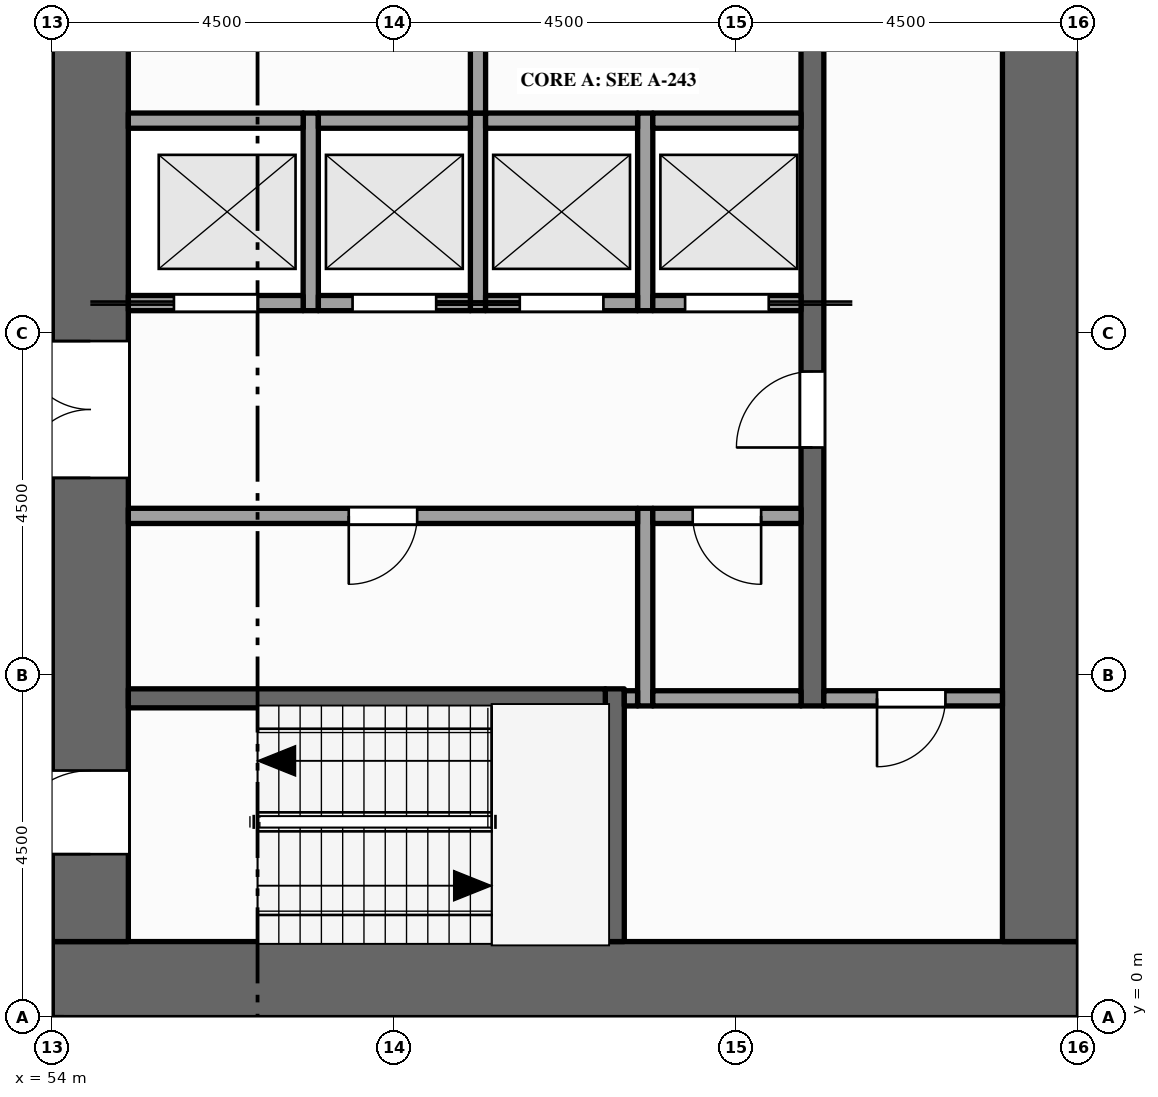
"""IFC4 building model, lengths in metres.
Left out: names, types, materials, properties, quantities, classifications, styles, units other than length and angle.
Written with IfcOpenShell. Run it as: python <this file> out.ifc"""

import sys

from ifc_helpers import new_model, si_unit, direction, frame, frame_2d, origin, place, context, subcontext, project, spatial, rectangle, extrude, element, fill, save


model = new_model("IFC4")
c1 = context("Model", 3, precision=1e-05, world=origin(), true_north=direction((0.0, 1.0)))
c2 = subcontext(c1, "Body", "Model", "MODEL_VIEW")
j1 = project(units=[si_unit("LENGTHUNIT", "METRE"), si_unit("PLANEANGLEUNIT", "RADIAN")], contexts=[c1])
p1 = place(None, origin())
s1 = spatial("IfcSite", under=j1, at=p1, CompositionType="ELEMENT")
p2 = place(p1, origin())
s2 = spatial("IfcBuilding", under=s1, at=p2, CompositionType="ELEMENT")
p3 = place(p2, frame((0.0, 0.0, 239.0)))
s3 = spatial("IfcBuildingStorey", under=s2, at=p3, CompositionType="ELEMENT", Elevation=239.0)
p4 = place(p3, frame((67.5, 0.5, -0.15), z_axis=(0.0, 0.0, 1.0), x_axis=(-1.0, 0.0, 0.0)))
e1 = element("IfcWall", 1, at=p4, inside=s3, PredefinedType="SHEAR", context=c2, shape_type="SweptSolid", body=[
    extrude(rectangle(XDim=13.5, YDim=1.0, at=frame_2d((6.75, 0.0))), origin(), (0.0, 0.0, 1.0), 4.0),
])
p5 = place(p3, frame((54.5, 1.0, -0.15), z_axis=(0.0, 0.0, 1.0), x_axis=(0.0, 1.0, 0.0)))
e2 = element("IfcWall", 2, at=p5, inside=s3, PredefinedType="SHEAR", context=c2, shape_type="SweptSolid", body=[
    extrude(rectangle(XDim=20.5, YDim=1.0, at=frame_2d((10.25, 0.0))), origin(), (0.0, 0.0, 1.0), 4.0),
])
p6 = place(p5, frame((6.1, 0.0, 0.15)))
e3 = element("IfcOpeningElement", 3, at=p6, cuts=e2, PredefinedType="OPENING", context=c2, shape_type="SweptSolid", body=[
    extrude(rectangle(XDim=1.8, YDim=2.1, at=frame_2d((0.9, 1.05))), frame((0.0, 0.51, 0.0), z_axis=(0.0, -1.0, 0.0), x_axis=(1.0, 0.0, 0.0)), (0.0, 0.0, 1.0), 1.02),
])
p7 = place(p5, frame((12.15, 0.0, 0.15)))
e4 = element("IfcOpeningElement", 4, at=p7, cuts=e2, PredefinedType="OPENING", context=c2, shape_type="SweptSolid", body=[
    extrude(rectangle(XDim=1.1, YDim=2.1, at=frame_2d((0.55, 1.05))), frame((0.0, 0.51, 0.0), z_axis=(0.0, -1.0, 0.0), x_axis=(1.0, 0.0, 0.0)), (0.0, 0.0, 1.0), 1.02),
])
p8 = place(p5, frame((1.15, 0.0, 0.15)))
e5 = element("IfcOpeningElement", 5, at=p8, cuts=e2, PredefinedType="OPENING", context=c2, shape_type="SweptSolid", body=[
    extrude(rectangle(XDim=1.1, YDim=2.1, at=frame_2d((0.55, 1.05))), frame((0.0, 0.51, 0.0), z_axis=(0.0, -1.0, 0.0), x_axis=(1.0, 0.0, 0.0)), (0.0, 0.0, 1.0), 1.02),
])
p9 = place(p5, frame((18.35, 0.0, 0.15)))
e6 = element("IfcOpeningElement", 6, at=p9, cuts=e2, PredefinedType="OPENING", context=c2, shape_type="SweptSolid", body=[
    extrude(rectangle(XDim=1.1, YDim=2.1, at=frame_2d((0.55, 1.05))), frame((0.0, 0.51, 0.0), z_axis=(0.0, -1.0, 0.0), x_axis=(1.0, 0.0, 0.0)), (0.0, 0.0, 1.0), 1.02),
])
p10 = place(p3, frame((67.0, 1.0, -0.15), z_axis=(0.0, 0.0, 1.0), x_axis=(0.0, 1.0, 0.0)))
e7 = element("IfcWall", 7, at=p10, inside=s3, PredefinedType="SHEAR", context=c2, shape_type="SweptSolid", body=[
    extrude(rectangle(XDim=20.5, YDim=1.0, at=frame_2d((10.25, 0.0))), origin(), (0.0, 0.0, 1.0), 4.0),
])
for number, where, z_axis, x_axis in (
    (8, (57.4, 9.3, 0.0), (0.0, 0.0, 1.0), (0.0, 1.0, 0.0)),
    (9, (59.6, 9.3, 0.0), (0.0, 0.0, 1.0), (0.0, 1.0, 0.0)),
):
    element("IfcWall", number, at=place(p3, frame(where, z_axis=z_axis, x_axis=x_axis)), inside=s3, PredefinedType="SOLIDWALL", context=c2, shape_type="SweptSolid", body=[
        extrude(rectangle(XDim=2.6, YDim=0.2, at=frame_2d((1.3, 0.0))), origin(), (0.0, 0.0, 1.0), 3.75),
    ])
p11 = place(p3, frame((59.6, 11.9, 0.0), z_axis=(0.0, 0.0, 1.0), x_axis=(0.0, 1.0, 0.0)))
e10 = element("IfcWall", 10, at=p11, inside=s3, PredefinedType="PARTITIONING", context=c2, shape_type="SweptSolid", body=[
    extrude(rectangle(XDim=3.6, YDim=0.2, at=frame_2d((1.8, 0.0))), origin(), (0.0, 0.0, 1.0), 3.75),
])
p12 = place(p11, frame((1.3, 0.0, 0.0)))
e11 = element("IfcOpeningElement", 11, at=p12, cuts=e10, PredefinedType="OPENING", context=c2, shape_type="SweptSolid", body=[
    extrude(rectangle(XDim=1.0, YDim=2.1, at=frame_2d((0.5, 1.05))), frame((0.0, 0.11, 0.0), z_axis=(0.0, -1.0, 0.0), x_axis=(1.0, 0.0, 0.0)), (0.0, 0.0, 1.0), 0.22),
])
p13 = place(p3, frame((61.4, 1.0, 0.0), z_axis=(0.0, 0.0, 1.0), x_axis=(0.0, 1.0, 0.0)))
e12 = element("IfcWall", 12, at=p13, inside=s3, PredefinedType="SHEAR", context=c2, shape_type="SweptSolid", body=[
    extrude(rectangle(XDim=3.325, YDim=0.25, at=frame_2d((1.663, 0.0))), origin(), (0.0, 0.0, 1.0), 3.75),
])
p14 = place(p3, frame((61.8, 4.1, 0.0), z_axis=(0.0, 0.0, 1.0), x_axis=(0.0, 1.0, 0.0)))
e13 = element("IfcWall", 13, at=p14, inside=s3, PredefinedType="PARTITIONING", context=c2, shape_type="SweptSolid", body=[
    extrude(rectangle(XDim=2.6, YDim=0.2, at=frame_2d((1.3, 0.0))), origin(), (0.0, 0.0, 1.0), 3.75),
])
p15 = place(p3, frame((61.8, 9.3, 0.0), z_axis=(0.0, 0.0, 1.0), x_axis=(0.0, 1.0, 0.0)))
e14 = element("IfcWall", 14, at=p15, inside=s3, PredefinedType="SOLIDWALL", context=c2, shape_type="SweptSolid", body=[
    extrude(rectangle(XDim=2.6, YDim=0.2, at=frame_2d((1.3, 0.0))), origin(), (0.0, 0.0, 1.0), 3.75),
])
p16 = place(p3, frame((64.0, 4.1, 0.0), z_axis=(0.0, 0.0, 1.0), x_axis=(0.0, 1.0, 0.0)))
e15 = element("IfcWall", 15, at=p16, inside=s3, PredefinedType="SHEAR", context=c2, shape_type="SweptSolid", body=[
    extrude(rectangle(XDim=14.5, YDim=0.3, at=frame_2d((7.25, 0.0))), origin(), (0.0, 0.0, 1.0), 3.75),
])
p17 = place(p16, frame((3.4, 0.0, 0.0)))
e16 = element("IfcOpeningElement", 16, at=p17, cuts=e15, PredefinedType="OPENING", context=c2, shape_type="SweptSolid", body=[
    extrude(rectangle(XDim=1.0, YDim=2.1, at=frame_2d((0.5, 1.05))), frame((0.0, 0.16, 0.0), z_axis=(0.0, -1.0, 0.0), x_axis=(1.0, 0.0, 0.0)), (0.0, 0.0, 1.0), 0.32),
])
p18 = place(p16, frame((9.1, 0.0, 0.0)))
e17 = element("IfcOpeningElement", 17, at=p18, cuts=e15, PredefinedType="OPENING", context=c2, shape_type="SweptSolid", body=[
    extrude(rectangle(XDim=1.0, YDim=2.1, at=frame_2d((0.5, 1.05))), frame((0.0, 0.16, 0.0), z_axis=(0.0, -1.0, 0.0), x_axis=(1.0, 0.0, 0.0)), (0.0, 0.0, 1.0), 0.32),
])
p19 = place(p3, frame((55.0, 4.2, 0.0), z_axis=(0.0, 0.0, 1.0), x_axis=(1.0, 0.0, 0.0)))
e18 = element("IfcWall", 18, at=p19, inside=s3, PredefinedType="SHEAR", context=c2, shape_type="SweptSolid", body=[
    extrude(rectangle(XDim=6.275, YDim=0.25, at=frame_2d((3.137, 0.0))), origin(), (0.0, 0.0, 1.0), 3.75),
])
p20 = place(p3, frame((61.525, 4.2, 0.0), z_axis=(0.0, 0.0, 1.0), x_axis=(1.0, 0.0, 0.0)))
e19 = element("IfcWall", 19, at=p20, inside=s3, PredefinedType="PARTITIONING", context=c2, shape_type="SweptSolid", body=[
    extrude(rectangle(XDim=0.175, YDim=0.2, at=frame_2d((0.087, 0.0))), origin(), (0.0, 0.0, 1.0), 3.75),
])
p21 = place(p3, frame((61.9, 4.2, 0.0), z_axis=(0.0, 0.0, 1.0), x_axis=(1.0, 0.0, 0.0)))
e20 = element("IfcWall", 20, at=p21, inside=s3, PredefinedType="PARTITIONING", context=c2, shape_type="SweptSolid", body=[
    extrude(rectangle(XDim=1.95, YDim=0.2, at=frame_2d((0.975, 0.0))), origin(), (0.0, 0.0, 1.0), 3.75),
])
p22 = place(p3, frame((64.15, 4.2, 0.0), z_axis=(0.0, 0.0, 1.0), x_axis=(1.0, 0.0, 0.0)))
e21 = element("IfcWall", 21, at=p22, inside=s3, PredefinedType="PARTITIONING", context=c2, shape_type="SweptSolid", body=[
    extrude(rectangle(XDim=2.35, YDim=0.2, at=frame_2d((1.175, 0.0))), origin(), (0.0, 0.0, 1.0), 3.75),
])
p23 = place(p22, frame((0.7, 0.0, 0.0)))
e22 = element("IfcOpeningElement", 22, at=p23, cuts=e21, PredefinedType="OPENING", context=c2, shape_type="SweptSolid", body=[
    extrude(rectangle(XDim=0.9, YDim=2.1, at=frame_2d((0.45, 1.05))), frame((0.0, 0.11, 0.0), z_axis=(0.0, -1.0, 0.0), x_axis=(1.0, 0.0, 0.0)), (0.0, 0.0, 1.0), 0.22),
])
p24 = place(p3, frame((55.0, 6.6, 0.0), z_axis=(0.0, 0.0, 1.0), x_axis=(1.0, 0.0, 0.0)))
e23 = element("IfcWall", 23, at=p24, inside=s3, PredefinedType="PARTITIONING", context=c2, shape_type="SweptSolid", body=[
    extrude(rectangle(XDim=6.7, YDim=0.2, at=frame_2d((3.35, 0.0))), origin(), (0.0, 0.0, 1.0), 3.75),
])
p25 = place(p24, frame((2.9, 0.0, 0.0)))
e24 = element("IfcOpeningElement", 24, at=p25, cuts=e23, PredefinedType="OPENING", context=c2, shape_type="SweptSolid", body=[
    extrude(rectangle(XDim=0.9, YDim=2.1, at=frame_2d((0.45, 1.05))), frame((0.0, 0.11, 0.0), z_axis=(0.0, -1.0, 0.0), x_axis=(1.0, 0.0, 0.0)), (0.0, 0.0, 1.0), 0.22),
])
p26 = place(p3, frame((61.9, 6.6, 0.0), z_axis=(0.0, 0.0, 1.0), x_axis=(1.0, 0.0, 0.0)))
e25 = element("IfcWall", 25, at=p26, inside=s3, PredefinedType="PARTITIONING", context=c2, shape_type="SweptSolid", body=[
    extrude(rectangle(XDim=1.95, YDim=0.2, at=frame_2d((0.975, 0.0))), origin(), (0.0, 0.0, 1.0), 3.75),
])
p27 = place(p26, frame((0.525, 0.0, 0.0)))
e26 = element("IfcOpeningElement", 26, at=p27, cuts=e25, PredefinedType="OPENING", context=c2, shape_type="SweptSolid", body=[
    extrude(rectangle(XDim=0.9, YDim=2.1, at=frame_2d((0.45, 1.05))), frame((0.0, 0.11, 0.0), z_axis=(0.0, -1.0, 0.0), x_axis=(1.0, 0.0, 0.0)), (0.0, 0.0, 1.0), 0.22),
])
p28 = place(p3, frame((55.0, 9.4, 0.0), z_axis=(0.0, 0.0, 1.0), x_axis=(1.0, 0.0, 0.0)))
e27 = element("IfcWall", 27, at=p28, inside=s3, PredefinedType="SOLIDWALL", context=c2, shape_type="SweptSolid", body=[
    extrude(rectangle(XDim=2.3, YDim=0.2, at=frame_2d((1.15, 0.0))), origin(), (0.0, 0.0, 1.0), 3.75),
])
p29 = place(p28, frame((0.6, 0.0, 0.012)))
e28 = element("IfcOpeningElement", 28, at=p29, cuts=e27, PredefinedType="OPENING", context=c2, shape_type="SweptSolid", body=[
    extrude(rectangle(XDim=1.1, YDim=2.1, at=frame_2d((0.55, 1.05))), frame((0.0, 0.11, 0.0), z_axis=(0.0, -1.0, 0.0), x_axis=(1.0, 0.0, 0.0)), (0.0, 0.0, 1.0), 0.22),
])
p30 = place(p3, frame((57.5, 9.4, 0.0), z_axis=(0.0, 0.0, 1.0), x_axis=(1.0, 0.0, 0.0)))
e29 = element("IfcWall", 29, at=p30, inside=s3, PredefinedType="SOLIDWALL", context=c2, shape_type="SweptSolid", body=[
    extrude(rectangle(XDim=2.0, YDim=0.2, at=frame_2d((1.0, 0.0))), origin(), (0.0, 0.0, 1.0), 3.75),
])
p31 = place(p30, frame((0.45, 0.0, 0.012)))
e30 = element("IfcOpeningElement", 30, at=p31, cuts=e29, PredefinedType="OPENING", context=c2, shape_type="SweptSolid", body=[
    extrude(rectangle(XDim=1.1, YDim=2.1, at=frame_2d((0.55, 1.05))), frame((0.0, 0.11, 0.0), z_axis=(0.0, -1.0, 0.0), x_axis=(1.0, 0.0, 0.0)), (0.0, 0.0, 1.0), 0.22),
])
p32 = place(p3, frame((59.7, 9.4, 0.0), z_axis=(0.0, 0.0, 1.0), x_axis=(1.0, 0.0, 0.0)))
e31 = element("IfcWall", 31, at=p32, inside=s3, PredefinedType="SOLIDWALL", context=c2, shape_type="SweptSolid", body=[
    extrude(rectangle(XDim=2.0, YDim=0.2, at=frame_2d((1.0, 0.0))), origin(), (0.0, 0.0, 1.0), 3.75),
])
p33 = place(p32, frame((0.45, 0.0, 0.012)))
e32 = element("IfcOpeningElement", 32, at=p33, cuts=e31, PredefinedType="OPENING", context=c2, shape_type="SweptSolid", body=[
    extrude(rectangle(XDim=1.1, YDim=2.1, at=frame_2d((0.55, 1.05))), frame((0.0, 0.11, 0.0), z_axis=(0.0, -1.0, 0.0), x_axis=(1.0, 0.0, 0.0)), (0.0, 0.0, 1.0), 0.22),
])
p34 = place(p3, frame((61.9, 9.4, 0.0), z_axis=(0.0, 0.0, 1.0), x_axis=(1.0, 0.0, 0.0)))
e33 = element("IfcWall", 33, at=p34, inside=s3, PredefinedType="SOLIDWALL", context=c2, shape_type="SweptSolid", body=[
    extrude(rectangle(XDim=1.95, YDim=0.2, at=frame_2d((0.975, 0.0))), origin(), (0.0, 0.0, 1.0), 3.75),
])
p35 = place(p34, frame((0.425, 0.0, 0.012)))
e34 = element("IfcOpeningElement", 34, at=p35, cuts=e33, PredefinedType="OPENING", context=c2, shape_type="SweptSolid", body=[
    extrude(rectangle(XDim=1.1, YDim=2.1, at=frame_2d((0.55, 1.05))), frame((0.0, 0.11, 0.0), z_axis=(0.0, -1.0, 0.0), x_axis=(1.0, 0.0, 0.0)), (0.0, 0.0, 1.0), 0.22),
])
p36 = place(p3, frame((55.0, 11.8, 0.0), z_axis=(0.0, 0.0, 1.0), x_axis=(1.0, 0.0, 0.0)))
e35 = element("IfcWall", 35, at=p36, inside=s3, PredefinedType="SOLIDWALL", context=c2, shape_type="SweptSolid", body=[
    extrude(rectangle(XDim=2.3, YDim=0.2, at=frame_2d((1.15, 0.0))), origin(), (0.0, 0.0, 1.0), 3.75),
])
for number, where, z_axis, x_axis in (
    (36, (57.5, 11.8, 0.0), (0.0, 0.0, 1.0), (1.0, 0.0, 0.0)),
    (37, (59.7, 11.8, 0.0), (0.0, 0.0, 1.0), (1.0, 0.0, 0.0)),
):
    element("IfcWall", number, at=place(p3, frame(where, z_axis=z_axis, x_axis=x_axis)), inside=s3, PredefinedType="SOLIDWALL", context=c2, shape_type="SweptSolid", body=[
        extrude(rectangle(XDim=2.0, YDim=0.2, at=frame_2d((1.0, 0.0))), origin(), (0.0, 0.0, 1.0), 3.75),
    ])
p37 = place(p3, frame((61.9, 11.8, 0.0), z_axis=(0.0, 0.0, 1.0), x_axis=(1.0, 0.0, 0.0)))
e38 = element("IfcWall", 38, at=p37, inside=s3, PredefinedType="SOLIDWALL", context=c2, shape_type="SweptSolid", body=[
    extrude(rectangle(XDim=1.95, YDim=0.2, at=frame_2d((0.975, 0.0))), origin(), (0.0, 0.0, 1.0), 3.75),
])
p38 = place(p29, origin())
e39 = element("IfcDoor", 39, at=p38, inside=s3, OperationType="SLIDING_TO_LEFT", PredefinedType="DOOR", context=c2, shape_type="SweptSolid", body=[
    extrude(rectangle(XDim=1.1, YDim=2.1, at=frame_2d((0.55, 1.05))), frame((0.0, 0.025, 0.0), z_axis=(0.0, -1.0, 0.0), x_axis=(1.0, 0.0, 0.0)), (0.0, 0.0, 1.0), 0.05),
])
fill(e28, e39)
p39 = place(p31, origin())
e40 = element("IfcDoor", 40, at=p39, inside=s3, OperationType="SLIDING_TO_RIGHT", PredefinedType="DOOR", context=c2, shape_type="SweptSolid", body=[
    extrude(rectangle(XDim=1.1, YDim=2.1, at=frame_2d((0.55, 1.05))), frame((0.0, 0.025, 0.0), z_axis=(0.0, -1.0, 0.0), x_axis=(1.0, 0.0, 0.0)), (0.0, 0.0, 1.0), 0.05),
])
fill(e30, e40)
p40 = place(p33, origin())
e41 = element("IfcDoor", 41, at=p40, inside=s3, OperationType="SLIDING_TO_LEFT", PredefinedType="DOOR", context=c2, shape_type="SweptSolid", body=[
    extrude(rectangle(XDim=1.1, YDim=2.1, at=frame_2d((0.55, 1.05))), frame((0.0, 0.025, 0.0), z_axis=(0.0, -1.0, 0.0), x_axis=(1.0, 0.0, 0.0)), (0.0, 0.0, 1.0), 0.05),
])
fill(e32, e41)
p41 = place(p35, origin())
e42 = element("IfcDoor", 42, at=p41, inside=s3, OperationType="SLIDING_TO_RIGHT", PredefinedType="DOOR", context=c2, shape_type="SweptSolid", body=[
    extrude(rectangle(XDim=1.1, YDim=2.1, at=frame_2d((0.55, 1.05))), frame((0.0, 0.025, 0.0), z_axis=(0.0, -1.0, 0.0), x_axis=(1.0, 0.0, 0.0)), (0.0, 0.0, 1.0), 0.05),
])
fill(e34, e42)
p42 = place(p6, origin())
e43 = element("IfcDoor", 43, at=p42, inside=s3, OperationType="DOUBLE_DOOR_SINGLE_SWING", PredefinedType="DOOR", context=c2, shape_type="SweptSolid", body=[
    extrude(rectangle(XDim=1.8, YDim=2.1, at=frame_2d((0.9, 1.05))), frame((0.0, 0.025, 0.0), z_axis=(0.0, -1.0, 0.0), x_axis=(1.0, 0.0, 0.0)), (0.0, 0.0, 1.0), 0.05),
])
fill(e3, e43)
p43 = place(p17, origin())
e44 = element("IfcDoor", 44, at=p43, inside=s3, OperationType="SINGLE_SWING_LEFT", PredefinedType="DOOR", context=c2, shape_type="SweptSolid", body=[
    extrude(rectangle(XDim=1.0, YDim=2.1, at=frame_2d((0.5, 1.05))), frame((0.0, 0.025, 0.0), z_axis=(0.0, -1.0, 0.0), x_axis=(1.0, 0.0, 0.0)), (0.0, 0.0, 1.0), 0.05),
])
fill(e16, e44)
p44 = place(p8, origin())
e45 = element("IfcDoor", 45, at=p44, inside=s3, OperationType="SINGLE_SWING_LEFT", PredefinedType="DOOR", context=c2, shape_type="SweptSolid", body=[
    extrude(rectangle(XDim=1.1, YDim=2.1, at=frame_2d((0.55, 1.05))), frame((0.0, 0.025, 0.0), z_axis=(0.0, -1.0, 0.0), x_axis=(1.0, 0.0, 0.0)), (0.0, 0.0, 1.0), 0.05),
])
fill(e5, e45)
p45 = place(p23, origin())
e46 = element("IfcDoor", 46, at=p45, inside=s3, OperationType="SINGLE_SWING_LEFT", PredefinedType="DOOR", context=c2, shape_type="SweptSolid", body=[
    extrude(rectangle(XDim=0.9, YDim=2.1, at=frame_2d((0.45, 1.05))), frame((0.0, 0.025, 0.0), z_axis=(0.0, -1.0, 0.0), x_axis=(1.0, 0.0, 0.0)), (0.0, 0.0, 1.0), 0.05),
])
fill(e22, e46)
p46 = place(p25, origin())
e47 = element("IfcDoor", 47, at=p46, inside=s3, OperationType="SINGLE_SWING_LEFT", PredefinedType="DOOR", context=c2, shape_type="SweptSolid", body=[
    extrude(rectangle(XDim=0.9, YDim=2.1, at=frame_2d((0.45, 1.05))), frame((0.0, 0.025, 0.0), z_axis=(0.0, -1.0, 0.0), x_axis=(1.0, 0.0, 0.0)), (0.0, 0.0, 1.0), 0.05),
])
fill(e24, e47)
p47 = place(p27, origin())
e48 = element("IfcDoor", 48, at=p47, inside=s3, OperationType="SINGLE_SWING_RIGHT", PredefinedType="DOOR", context=c2, shape_type="SweptSolid", body=[
    extrude(rectangle(XDim=0.9, YDim=2.1, at=frame_2d((0.45, 1.05))), frame((0.0, 0.025, 0.0), z_axis=(0.0, -1.0, 0.0), x_axis=(1.0, 0.0, 0.0)), (0.0, 0.0, 1.0), 0.05),
])
fill(e26, e48)
save(model, sys.argv[1])
